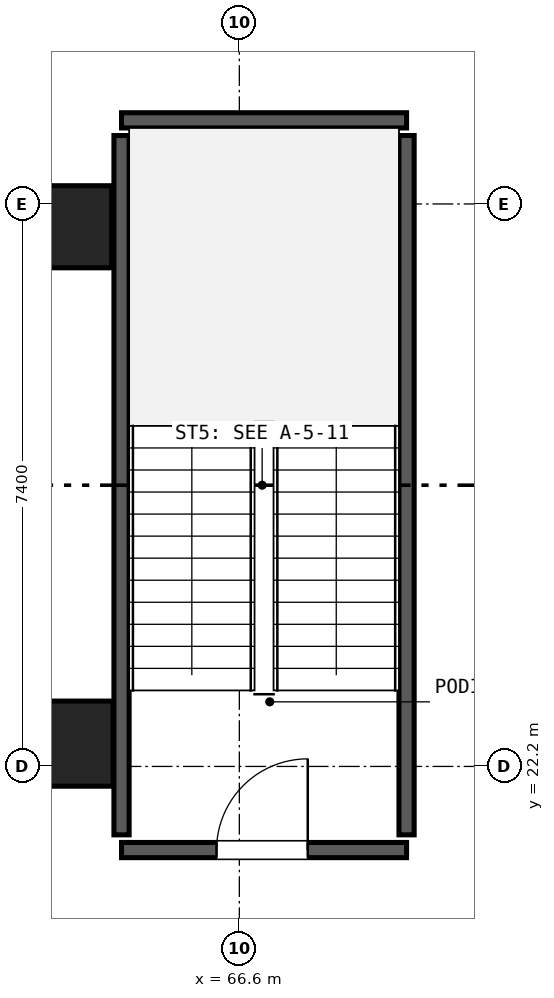
"""IFC4 building model, lengths in metres.
Left out: names, types, materials, properties, quantities, classifications, styles, units other than length and angle.
Written with IfcOpenShell. Run it as: python <this file> out.ifc"""

import sys

from ifc_helpers import new_model, si_unit, direction, frame, frame_2d, origin, origin_2d, place, context, subcontext, project, spatial, rectangle, circle, extrude, element, fill, save


model = new_model("IFC4")
c1 = context("Model", 3, precision=1e-05, world=origin(), true_north=direction((0.0, 1.0)))
c2 = subcontext(c1, "Body", "Model", "MODEL_VIEW")
j1 = project(units=[si_unit("LENGTHUNIT", "METRE"), si_unit("PLANEANGLEUNIT", "RADIAN")], contexts=[c1])
p1 = place(None, origin())
s1 = spatial("IfcSite", under=j1, at=p1, CompositionType="ELEMENT")
p2 = place(p1, origin())
s2 = spatial("IfcBuilding", under=s1, at=p2, CompositionType="ELEMENT")
p3 = place(p2, frame((0.0, 0.0, -9.72)))
s3 = spatial("IfcBuildingStorey", under=s2, at=p3, CompositionType="ELEMENT", Elevation=-9.72)
p4 = place(p3, frame((64.38, 22.5, 0.0), z_axis=(0.0, 0.0, 1.0), x_axis=(1.0, 0.0, 0.0)))
e1 = element("IfcColumn", 1, at=p4, inside=s3, PredefinedType="COLUMN", context=c2, shape_type="SweptSolid", body=[
    extrude(circle(Radius=0.56, at=origin_2d()), origin(), (0.0, 0.0, 1.0), 4.86),
])
p5 = place(p3, frame((64.38, 29.3, 0.0), z_axis=(0.0, 0.0, 1.0), x_axis=(1.0, 0.0, 0.0)))
e2 = element("IfcColumn", 2, at=p5, inside=s3, PredefinedType="COLUMN", context=c2, shape_type="SweptSolid", body=[
    extrude(rectangle(XDim=1.08, YDim=1.08, at=origin_2d()), origin(), (0.0, 0.0, 1.0), 4.86),
])
p6 = place(p3, frame((65.05, 21.1, 0.0), z_axis=(0.0, 0.0, 1.0), x_axis=(1.0, 0.0, 0.0)))
e3 = element("IfcWall", 3, at=p6, inside=s3, PredefinedType="SHEAR", context=c2, shape_type="SweptSolid", body=[
    extrude(rectangle(XDim=3.75, YDim=0.2, at=frame_2d((1.875, 0.0))), origin(), (0.0, 0.0, 1.0), 4.56),
])
p7 = place(p6, frame((1.25, 0.0, 0.0)))
e4 = element("IfcOpeningElement", 4, at=p7, cuts=e3, PredefinedType="OPENING", context=c2, shape_type="SweptSolid", body=[
    extrude(rectangle(XDim=1.2, YDim=2.15, at=frame_2d((0.6, 1.075))), frame((0.0, 0.11, 0.0), z_axis=(0.0, -1.0, 0.0), x_axis=(1.0, 0.0, 0.0)), (0.0, 0.0, 1.0), 0.22),
])
p8 = place(p3, frame((65.05, 30.7, 0.0), z_axis=(0.0, 0.0, 1.0), x_axis=(1.0, 0.0, 0.0)))
e5 = element("IfcWall", 5, at=p8, inside=s3, PredefinedType="SHEAR", context=c2, shape_type="SweptSolid", body=[
    extrude(rectangle(XDim=3.75, YDim=0.2, at=frame_2d((1.875, 0.0))), origin(), (0.0, 0.0, 1.0), 4.56),
])
for number, where, z_axis, x_axis in (
    (6, (65.05, 21.3, 0.0), (0.0, 0.0, 1.0), (0.0, 1.0, 0.0)),
    (7, (68.8, 21.3, 0.0), (0.0, 0.0, 1.0), (0.0, 1.0, 0.0)),
):
    element("IfcWall", number, at=place(p3, frame(where, z_axis=z_axis, x_axis=x_axis)), inside=s3, PredefinedType="SHEAR", context=c2, shape_type="SweptSolid", body=[
        extrude(rectangle(XDim=9.2, YDim=0.2, at=frame_2d((4.6, 0.0))), origin(), (0.0, 0.0, 1.0), 4.56),
    ])
p9 = place(p7, origin())
e8 = element("IfcDoor", 8, at=p9, inside=s3, OperationType="SINGLE_SWING_RIGHT", PredefinedType="DOOR", context=c2, shape_type="SweptSolid", body=[
    extrude(rectangle(XDim=1.2, YDim=2.15, at=frame_2d((0.6, 1.075))), frame((0.0, 0.025, 0.0), z_axis=(0.0, -1.0, 0.0), x_axis=(1.0, 0.0, 0.0)), (0.0, 0.0, 1.0), 0.05),
])
fill(e4, e8)
save(model, sys.argv[1])
